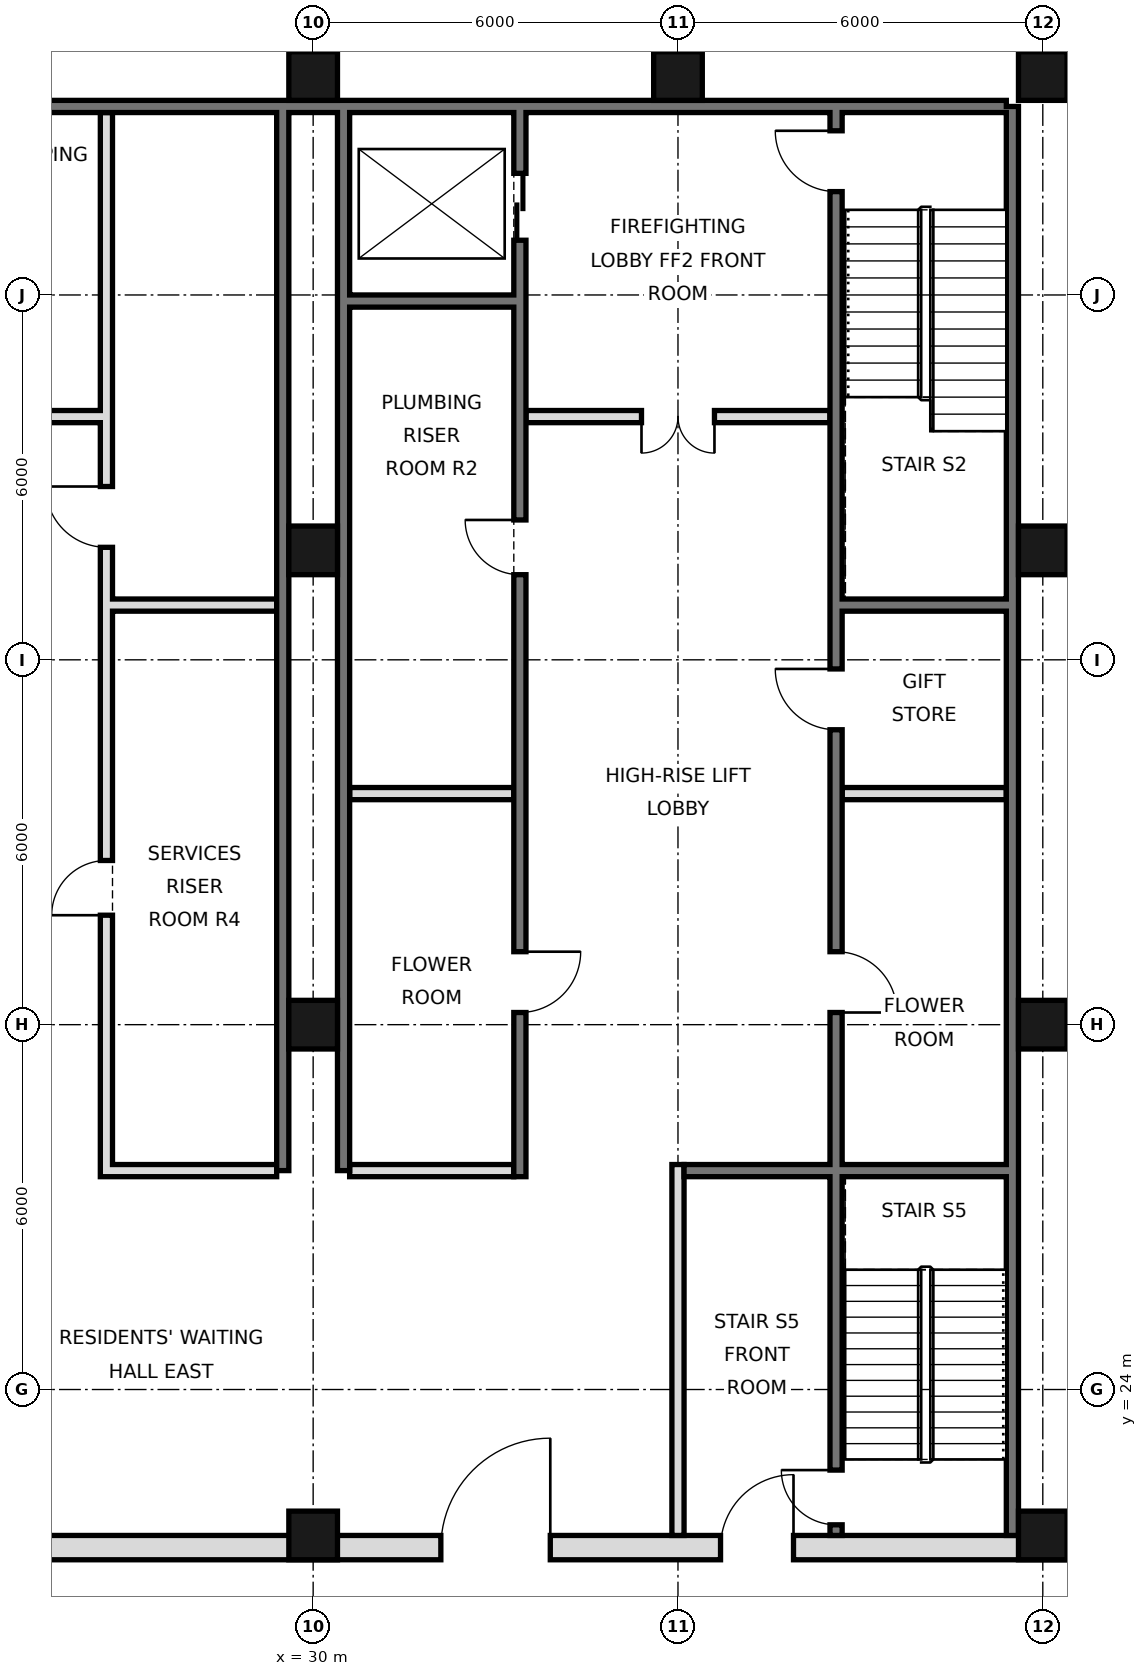
"""IFC4 building model, lengths in metres.
Left out: names, types, materials, properties, quantities, classifications, styles, units other than length and angle.
Written with IfcOpenShell. Run it as: python <this file> out.ifc"""

import sys

from ifc_helpers import new_model, si_unit, direction, frame, frame_2d, origin, origin_2d, place, context, subcontext, project, spatial, rectangle, hollow_rectangle, extrude, element, fill, save


model = new_model("IFC4")
c1 = context("Model", 3, precision=1e-05, world=origin(), true_north=direction((0.0, 1.0)))
c2 = subcontext(c1, "Body", "Model", "MODEL_VIEW")
j1 = project(units=[si_unit("LENGTHUNIT", "METRE"), si_unit("PLANEANGLEUNIT", "RADIAN")], contexts=[c1])
p1 = place(None, origin())
s1 = spatial("IfcSite", under=j1, at=p1, CompositionType="ELEMENT")
p2 = place(p1, origin())
s2 = spatial("IfcBuilding", under=s1, at=p2, CompositionType="ELEMENT")
p3 = place(p2, frame((0.0, 0.0, 134.0)))
s3 = spatial("IfcBuildingStorey", under=s2, at=p3, CompositionType="ELEMENT", Elevation=134.0)
for number, where, z_axis, x_axis in (
    (1, (30.0, 21.6, 0.0), (0.0, 0.0, 1.0), (1.0, 0.0, 0.0)),
    (2, (30.0, 30.0, 0.0), (0.0, 0.0, 1.0), (1.0, 0.0, 0.0)),
    (3, (30.0, 37.8, 0.0), (0.0, 0.0, 1.0), (1.0, 0.0, 0.0)),
    (4, (30.0, 45.6, 0.0), (0.0, 0.0, 1.0), (1.0, 0.0, 0.0)),
    (5, (36.0, 45.6, 0.0), (0.0, 0.0, 1.0), (1.0, 0.0, 0.0)),
    (6, (42.0, 21.6, 0.0), (0.0, 0.0, 1.0), (1.0, 0.0, 0.0)),
    (7, (42.0, 30.0, 0.0), (0.0, 0.0, 1.0), (1.0, 0.0, 0.0)),
    (8, (42.0, 37.8, 0.0), (0.0, 0.0, 1.0), (1.0, 0.0, 0.0)),
    (9, (42.0, 45.6, 0.0), (0.0, 0.0, 1.0), (1.0, 0.0, 0.0)),
):
    element("IfcColumn", number, at=place(p3, frame(where, z_axis=z_axis, x_axis=x_axis)), inside=s3, PredefinedType="COLUMN", context=c2, shape_type="SweptSolid", body=[
        extrude(hollow_rectangle(XDim=0.8, YDim=0.8, WallThickness=0.05, at=origin_2d()), origin(), (0.0, 0.0, 1.0), 4.4),
    ])
p4 = place(p3, frame((41.5, 21.6, 0.0), z_axis=(0.0, 0.0, 1.0), x_axis=(0.0, 1.0, 0.0)))
e10 = element("IfcWall", 10, at=p4, inside=s3, PredefinedType="SOLIDWALL", context=c2, shape_type="SweptSolid", body=[
    extrude(rectangle(XDim=23.5, YDim=0.2, at=frame_2d((11.75, 0.0))), origin(), (0.0, 0.0, 1.0), 4.1),
])
p5 = place(p3, frame((6.6, 45.1, 0.0), z_axis=(0.0, 0.0, 1.0), x_axis=(1.0, 0.0, 0.0)))
e11 = element("IfcWall", 11, at=p5, inside=s3, PredefinedType="SOLIDWALL", context=c2, shape_type="SweptSolid", body=[
    extrude(rectangle(XDim=34.8, YDim=0.2, at=frame_2d((17.4, 0.0))), origin(), (0.0, 0.0, 1.0), 4.1),
])
for number, where, z_axis, x_axis in (
    (12, (29.5, 27.6, 0.0), (0.0, 0.0, 1.0), (0.0, 1.0, 0.0)),
    (13, (30.5, 27.6, 0.0), (0.0, 0.0, 1.0), (0.0, 1.0, 0.0)),
):
    element("IfcWall", number, at=place(p3, frame(where, z_axis=z_axis, x_axis=x_axis)), inside=s3, PredefinedType="SOLIDWALL", context=c2, shape_type="SweptSolid", body=[
        extrude(rectangle(XDim=17.5, YDim=0.2, at=frame_2d((8.75, 0.0))), origin(), (0.0, 0.0, 1.0), 4.1),
    ])
p6 = place(p3, frame((5.6, 21.4, 0.0), z_axis=(0.0, 0.0, 1.0), x_axis=(1.0, 0.0, 0.0)))
e14 = element("IfcWall", 14, at=p6, inside=s3, PredefinedType="SOLIDWALL", context=c2, shape_type="SweptSolid", body=[
    extrude(rectangle(XDim=36.8, YDim=0.4, at=frame_2d((18.4, 0.0))), origin(), (0.0, 0.0, 1.0), 4.1),
])
p7 = place(p6, frame((8.5, 0.0, 0.0)))
e15 = element("IfcOpeningElement", 15, at=p7, cuts=e14, PredefinedType="OPENING", context=c2, shape_type="SweptSolid", body=[
    extrude(rectangle(XDim=1.8, YDim=2.1, at=frame_2d((0.9, 1.05))), frame((0.0, 0.21, 0.0), z_axis=(0.0, -1.0, 0.0), x_axis=(1.0, 0.0, 0.0)), (0.0, 0.0, 1.0), 0.42),
])
p8 = place(p6, frame((17.5, 0.0, 0.0)))
e16 = element("IfcOpeningElement", 16, at=p8, cuts=e14, PredefinedType="OPENING", context=c2, shape_type="SweptSolid", body=[
    extrude(rectangle(XDim=1.8, YDim=2.1, at=frame_2d((0.9, 1.05))), frame((0.0, 0.21, 0.0), z_axis=(0.0, -1.0, 0.0), x_axis=(1.0, 0.0, 0.0)), (0.0, 0.0, 1.0), 0.42),
])
p9 = place(p6, frame((26.5, 0.0, 0.0)))
e17 = element("IfcOpeningElement", 17, at=p9, cuts=e14, PredefinedType="OPENING", context=c2, shape_type="SweptSolid", body=[
    extrude(rectangle(XDim=1.8, YDim=2.1, at=frame_2d((0.9, 1.05))), frame((0.0, 0.21, 0.0), z_axis=(0.0, -1.0, 0.0), x_axis=(1.0, 0.0, 0.0)), (0.0, 0.0, 1.0), 0.42),
])
p10 = place(p6, frame((4.5, 0.0, 0.0)))
e18 = element("IfcOpeningElement", 18, at=p10, cuts=e14, PredefinedType="OPENING", context=c2, shape_type="SweptSolid", body=[
    extrude(rectangle(XDim=1.2, YDim=2.1, at=frame_2d((0.6, 1.05))), frame((0.0, 0.21, 0.0), z_axis=(0.0, -1.0, 0.0), x_axis=(1.0, 0.0, 0.0)), (0.0, 0.0, 1.0), 0.42),
])
p11 = place(p6, frame((31.1, 0.0, 0.0)))
e19 = element("IfcOpeningElement", 19, at=p11, cuts=e14, PredefinedType="OPENING", context=c2, shape_type="SweptSolid", body=[
    extrude(rectangle(XDim=1.2, YDim=2.1, at=frame_2d((0.6, 1.05))), frame((0.0, 0.21, 0.0), z_axis=(0.0, -1.0, 0.0), x_axis=(1.0, 0.0, 0.0)), (0.0, 0.0, 1.0), 0.42),
])
p12 = place(p3, frame((26.6, 27.5, 0.0), z_axis=(0.0, 0.0, 1.0), x_axis=(0.0, 1.0, 0.0)))
e20 = element("IfcWall", 20, at=p12, inside=s3, PredefinedType="SOLIDWALL", context=c2, shape_type="SweptSolid", body=[
    extrude(rectangle(XDim=17.5, YDim=0.2, at=frame_2d((8.75, 0.0))), origin(), (0.0, 0.0, 1.0), 4.1),
])
p13 = place(p12, frame((4.3, 0.0, 0.0)))
e21 = element("IfcOpeningElement", 21, at=p13, cuts=e20, PredefinedType="OPENING", context=c2, shape_type="SweptSolid", body=[
    extrude(rectangle(XDim=0.9, YDim=2.1, at=frame_2d((0.45, 1.05))), frame((0.0, 0.11, 0.0), z_axis=(0.0, -1.0, 0.0), x_axis=(1.0, 0.0, 0.0)), (0.0, 0.0, 1.0), 0.22),
])
p14 = place(p12, frame((10.35, 0.0, 0.0)))
e22 = element("IfcOpeningElement", 22, at=p14, cuts=e20, PredefinedType="OPENING", context=c2, shape_type="SweptSolid", body=[
    extrude(rectangle(XDim=1.0, YDim=2.1, at=frame_2d((0.5, 1.05))), frame((0.0, 0.11, 0.0), z_axis=(0.0, -1.0, 0.0), x_axis=(1.0, 0.0, 0.0)), (0.0, 0.0, 1.0), 0.22),
])
p15 = place(p3, frame((33.4, 27.5, 0.0), z_axis=(0.0, 0.0, 1.0), x_axis=(0.0, 1.0, 0.0)))
e23 = element("IfcWall", 23, at=p15, inside=s3, PredefinedType="SOLIDWALL", context=c2, shape_type="SweptSolid", body=[
    extrude(rectangle(XDim=17.5, YDim=0.2, at=frame_2d((8.75, 0.0))), origin(), (0.0, 0.0, 1.0), 4.1),
])
p16 = place(p15, frame((15.4, 0.0, 0.0)))
e24 = element("IfcOpeningElement", 24, at=p16, cuts=e23, PredefinedType="OPENING", context=c2, shape_type="SweptSolid", body=[
    extrude(rectangle(XDim=1.1, YDim=2.1, at=frame_2d((0.55, 1.05))), frame((0.0, 0.11, 0.0), z_axis=(0.0, -1.0, 0.0), x_axis=(1.0, 0.0, 0.0)), (0.0, 0.0, 1.0), 0.22),
])
p17 = place(p15, frame((2.7, 0.0, 0.0)))
e25 = element("IfcOpeningElement", 25, at=p17, cuts=e23, PredefinedType="OPENING", context=c2, shape_type="SweptSolid", body=[
    extrude(rectangle(XDim=1.0, YDim=2.1, at=frame_2d((0.5, 1.05))), frame((0.0, 0.11, 0.0), z_axis=(0.0, -1.0, 0.0), x_axis=(1.0, 0.0, 0.0)), (0.0, 0.0, 1.0), 0.22),
])
p18 = place(p15, frame((9.9, 0.0, 0.0)))
e26 = element("IfcOpeningElement", 26, at=p18, cuts=e23, PredefinedType="OPENING", context=c2, shape_type="SweptSolid", body=[
    extrude(rectangle(XDim=0.9, YDim=2.1, at=frame_2d((0.45, 1.05))), frame((0.0, 0.11, 0.0), z_axis=(0.0, -1.0, 0.0), x_axis=(1.0, 0.0, 0.0)), (0.0, 0.0, 1.0), 0.22),
])
p19 = place(p3, frame((36.0, 21.6, 0.0), z_axis=(0.0, 0.0, 1.0), x_axis=(0.0, 1.0, 0.0)))
e27 = element("IfcWall", 27, at=p19, inside=s3, PredefinedType="PARTITIONING", context=c2, shape_type="SweptSolid", body=[
    extrude(rectangle(XDim=6.1, YDim=0.2, at=frame_2d((3.05, 0.0))), origin(), (0.0, 0.0, 1.0), 4.1),
])
p20 = place(p3, frame((38.6, 21.6, 0.0), z_axis=(0.0, 0.0, 1.0), x_axis=(0.0, 1.0, 0.0)))
e28 = element("IfcWall", 28, at=p20, inside=s3, PredefinedType="SOLIDWALL", context=c2, shape_type="SweptSolid", body=[
    extrude(rectangle(XDim=23.4, YDim=0.2, at=frame_2d((11.7, 0.0))), origin(), (0.0, 0.0, 1.0), 4.1),
])
p21 = place(p20, frame((8.6, 0.0, 0.0)))
e29 = element("IfcOpeningElement", 29, at=p21, cuts=e28, PredefinedType="OPENING", context=c2, shape_type="SweptSolid", body=[
    extrude(rectangle(XDim=1.0, YDim=2.1, at=frame_2d((0.5, 1.05))), frame((0.0, 0.11, 0.0), z_axis=(0.0, -1.0, 0.0), x_axis=(1.0, 0.0, 0.0)), (0.0, 0.0, 1.0), 0.22),
])
p22 = place(p20, frame((13.25, 0.0, 0.0)))
e30 = element("IfcOpeningElement", 30, at=p22, cuts=e28, PredefinedType="OPENING", context=c2, shape_type="SweptSolid", body=[
    extrude(rectangle(XDim=1.0, YDim=2.1, at=frame_2d((0.5, 1.05))), frame((0.0, 0.11, 0.0), z_axis=(0.0, -1.0, 0.0), x_axis=(1.0, 0.0, 0.0)), (0.0, 0.0, 1.0), 0.22),
])
p23 = place(p20, frame((22.1, 0.0, 0.0)))
e31 = element("IfcOpeningElement", 31, at=p23, cuts=e28, PredefinedType="OPENING", context=c2, shape_type="SweptSolid", body=[
    extrude(rectangle(XDim=1.0, YDim=2.1, at=frame_2d((0.5, 1.05))), frame((0.0, 0.11, 0.0), z_axis=(0.0, -1.0, 0.0), x_axis=(1.0, 0.0, 0.0)), (0.0, 0.0, 1.0), 0.22),
])
p24 = place(p20, frame((0.175, 0.0, 0.0)))
e32 = element("IfcOpeningElement", 32, at=p24, cuts=e28, PredefinedType="OPENING", context=c2, shape_type="SweptSolid", body=[
    extrude(rectangle(XDim=0.9, YDim=2.1, at=frame_2d((0.45, 1.05))), frame((0.0, 0.11, 0.0), z_axis=(0.0, -1.0, 0.0), x_axis=(1.0, 0.0, 0.0)), (0.0, 0.0, 1.0), 0.22),
])
p25 = place(p3, frame((26.7, 27.6, 0.0), z_axis=(0.0, 0.0, 1.0), x_axis=(1.0, 0.0, 0.0)))
e33 = element("IfcWall", 33, at=p25, inside=s3, PredefinedType="SOLIDWALL", context=c2, shape_type="SweptSolid", body=[
    extrude(rectangle(XDim=2.7, YDim=0.2, at=frame_2d((1.35, 0.0))), origin(), (0.0, 0.0, 1.0), 4.1),
])
p26 = place(p3, frame((30.6, 27.6, 0.0), z_axis=(0.0, 0.0, 1.0), x_axis=(1.0, 0.0, 0.0)))
e34 = element("IfcWall", 34, at=p26, inside=s3, PredefinedType="PARTITIONING", context=c2, shape_type="SweptSolid", body=[
    extrude(rectangle(XDim=2.7, YDim=0.2, at=frame_2d((1.35, 0.0))), origin(), (0.0, 0.0, 1.0), 4.1),
])
p27 = place(p3, frame((36.1, 27.6, 0.0), z_axis=(0.0, 0.0, 1.0), x_axis=(1.0, 0.0, 0.0)))
e35 = element("IfcWall", 35, at=p27, inside=s3, PredefinedType="SOLIDWALL", context=c2, shape_type="SweptSolid", body=[
    extrude(rectangle(XDim=5.3, YDim=0.2, at=frame_2d((2.65, 0.0))), origin(), (0.0, 0.0, 1.0), 4.1),
])
p28 = place(p3, frame((30.6, 33.8, 0.0), z_axis=(0.0, 0.0, 1.0), x_axis=(1.0, 0.0, 0.0)))
e36 = element("IfcWall", 36, at=p28, inside=s3, PredefinedType="SOLIDWALL", context=c2, shape_type="SweptSolid", body=[
    extrude(rectangle(XDim=2.7, YDim=0.2, at=frame_2d((1.35, 0.0))), origin(), (0.0, 0.0, 1.0), 4.1),
])
p29 = place(p3, frame((38.7, 33.8, 0.0), z_axis=(0.0, 0.0, 1.0), x_axis=(1.0, 0.0, 0.0)))
e37 = element("IfcWall", 37, at=p29, inside=s3, PredefinedType="PARTITIONING", context=c2, shape_type="SweptSolid", body=[
    extrude(rectangle(XDim=2.7, YDim=0.2, at=frame_2d((1.35, 0.0))), origin(), (0.0, 0.0, 1.0), 4.1),
])
for number, where, z_axis, x_axis in (
    (38, (26.7, 36.9, 0.0), (0.0, 0.0, 1.0), (1.0, 0.0, 0.0)),
    (39, (38.7, 36.9, 0.0), (0.0, 0.0, 1.0), (1.0, 0.0, 0.0)),
):
    element("IfcWall", number, at=place(p3, frame(where, z_axis=z_axis, x_axis=x_axis)), inside=s3, PredefinedType="SOLIDWALL", context=c2, shape_type="SweptSolid", body=[
        extrude(rectangle(XDim=2.7, YDim=0.2, at=frame_2d((1.35, 0.0))), origin(), (0.0, 0.0, 1.0), 4.1),
    ])
p30 = place(p3, frame((21.5, 40.0, 0.0), z_axis=(0.0, 0.0, 1.0), x_axis=(1.0, 0.0, 0.0)))
e40 = element("IfcWall", 40, at=p30, inside=s3, PredefinedType="PARTITIONING", context=c2, shape_type="SweptSolid", body=[
    extrude(rectangle(XDim=5.0, YDim=0.2, at=frame_2d((2.5, 0.0))), origin(), (0.0, 0.0, 1.0), 4.1),
])
p31 = place(p30, frame((1.9, 0.0, 0.0)))
e41 = element("IfcOpeningElement", 41, at=p31, cuts=e40, PredefinedType="OPENING", context=c2, shape_type="SweptSolid", body=[
    extrude(rectangle(XDim=1.2, YDim=2.1, at=frame_2d((0.6, 1.05))), frame((0.0, 0.11, 0.0), z_axis=(0.0, -1.0, 0.0), x_axis=(1.0, 0.0, 0.0)), (0.0, 0.0, 1.0), 0.22),
])
p32 = place(p3, frame((33.5, 40.0, 0.0), z_axis=(0.0, 0.0, 1.0), x_axis=(1.0, 0.0, 0.0)))
e42 = element("IfcWall", 42, at=p32, inside=s3, PredefinedType="PARTITIONING", context=c2, shape_type="SweptSolid", body=[
    extrude(rectangle(XDim=5.0, YDim=0.2, at=frame_2d((2.5, 0.0))), origin(), (0.0, 0.0, 1.0), 4.1),
])
p33 = place(p32, frame((1.9, 0.0, 0.0)))
e43 = element("IfcOpeningElement", 43, at=p33, cuts=e42, PredefinedType="OPENING", context=c2, shape_type="SweptSolid", body=[
    extrude(rectangle(XDim=1.2, YDim=2.1, at=frame_2d((0.6, 1.05))), frame((0.0, 0.11, 0.0), z_axis=(0.0, -1.0, 0.0), x_axis=(1.0, 0.0, 0.0)), (0.0, 0.0, 1.0), 0.22),
])
p34 = place(p3, frame((30.6, 41.9, 0.0), z_axis=(0.0, 0.0, 1.0), x_axis=(1.0, 0.0, 0.0)))
e44 = element("IfcWall", 44, at=p34, inside=s3, PredefinedType="SOLIDWALL", context=c2, shape_type="SweptSolid", body=[
    extrude(rectangle(XDim=2.7, YDim=0.2, at=frame_2d((1.35, 0.0))), origin(), (0.0, 0.0, 1.0), 4.1),
])
p35 = place(p9, frame((1.8, 0.0, 0.0), z_axis=(0.0, 0.0, 1.0), x_axis=(-1.0, 0.0, 0.0)))
e45 = element("IfcDoor", 45, at=p35, inside=s3, OperationType="SINGLE_SWING_LEFT", PredefinedType="DOOR", context=c2, shape_type="SweptSolid", body=[
    extrude(rectangle(XDim=1.8, YDim=2.1, at=frame_2d((0.9, 1.05))), frame((0.0, 0.025, 0.0), z_axis=(0.0, -1.0, 0.0), x_axis=(1.0, 0.0, 0.0)), (0.0, 0.0, 1.0), 0.05),
])
fill(e17, e45)
p36 = place(p11, frame((1.2, 0.0, 0.0), z_axis=(0.0, 0.0, 1.0), x_axis=(-1.0, 0.0, 0.0)))
e46 = element("IfcDoor", 46, at=p36, inside=s3, OperationType="SINGLE_SWING_LEFT", PredefinedType="DOOR", context=c2, shape_type="SweptSolid", body=[
    extrude(rectangle(XDim=1.2, YDim=2.1, at=frame_2d((0.6, 1.05))), frame((0.0, 0.025, 0.0), z_axis=(0.0, -1.0, 0.0), x_axis=(1.0, 0.0, 0.0)), (0.0, 0.0, 1.0), 0.05),
])
fill(e19, e46)
p37 = place(p33, frame((1.2, 0.0, 0.0), z_axis=(0.0, 0.0, 1.0), x_axis=(-1.0, 0.0, 0.0)))
e47 = element("IfcDoor", 47, at=p37, inside=s3, OperationType="DOUBLE_DOOR_SINGLE_SWING", PredefinedType="DOOR", context=c2, shape_type="SweptSolid", body=[
    extrude(rectangle(XDim=1.2, YDim=2.1, at=frame_2d((0.6, 1.05))), frame((0.0, 0.025, 0.0), z_axis=(0.0, -1.0, 0.0), x_axis=(1.0, 0.0, 0.0)), (0.0, 0.0, 1.0), 0.05),
])
fill(e43, e47)
p38 = place(p16, origin())
e48 = element("IfcDoor", 48, at=p38, inside=s3, OperationType="DOUBLE_DOOR_SLIDING", PredefinedType="DOOR", context=c2, shape_type="SweptSolid", body=[
    extrude(rectangle(XDim=1.1, YDim=2.1, at=frame_2d((0.55, 1.05))), frame((0.0, 0.025, 0.0), z_axis=(0.0, -1.0, 0.0), x_axis=(1.0, 0.0, 0.0)), (0.0, 0.0, 1.0), 0.05),
])
fill(e24, e48)
p39 = place(p21, frame((1.0, 0.0, 0.0), z_axis=(0.0, 0.0, 1.0), x_axis=(-1.0, 0.0, 0.0)))
e49 = element("IfcDoor", 49, at=p39, inside=s3, OperationType="SINGLE_SWING_RIGHT", PredefinedType="DOOR", context=c2, shape_type="SweptSolid", body=[
    extrude(rectangle(XDim=1.0, YDim=2.1, at=frame_2d((0.5, 1.05))), frame((0.0, 0.025, 0.0), z_axis=(0.0, -1.0, 0.0), x_axis=(1.0, 0.0, 0.0)), (0.0, 0.0, 1.0), 0.05),
])
fill(e29, e49)
p40 = place(p22, frame((1.0, 0.0, 0.0), z_axis=(0.0, 0.0, 1.0), x_axis=(-1.0, 0.0, 0.0)))
e50 = element("IfcDoor", 50, at=p40, inside=s3, OperationType="SINGLE_SWING_LEFT", PredefinedType="DOOR", context=c2, shape_type="SweptSolid", body=[
    extrude(rectangle(XDim=1.0, YDim=2.1, at=frame_2d((0.5, 1.05))), frame((0.0, 0.025, 0.0), z_axis=(0.0, -1.0, 0.0), x_axis=(1.0, 0.0, 0.0)), (0.0, 0.0, 1.0), 0.05),
])
fill(e30, e50)
p41 = place(p17, origin())
e51 = element("IfcDoor", 51, at=p41, inside=s3, OperationType="SINGLE_SWING_RIGHT", PredefinedType="DOOR", context=c2, shape_type="SweptSolid", body=[
    extrude(rectangle(XDim=1.0, YDim=2.1, at=frame_2d((0.5, 1.05))), frame((0.0, 0.025, 0.0), z_axis=(0.0, -1.0, 0.0), x_axis=(1.0, 0.0, 0.0)), (0.0, 0.0, 1.0), 0.05),
])
fill(e25, e51)
p42 = place(p23, frame((1.0, 0.0, 0.0), z_axis=(0.0, 0.0, 1.0), x_axis=(-1.0, 0.0, 0.0)))
e52 = element("IfcDoor", 52, at=p42, inside=s3, OperationType="SINGLE_SWING_LEFT", PredefinedType="DOOR", context=c2, shape_type="SweptSolid", body=[
    extrude(rectangle(XDim=1.0, YDim=2.1, at=frame_2d((0.5, 1.05))), frame((0.0, 0.025, 0.0), z_axis=(0.0, -1.0, 0.0), x_axis=(1.0, 0.0, 0.0)), (0.0, 0.0, 1.0), 0.05),
])
fill(e31, e52)
p43 = place(p24, frame((0.9, 0.0, 0.0), z_axis=(0.0, 0.0, 1.0), x_axis=(-1.0, 0.0, 0.0)))
e53 = element("IfcDoor", 53, at=p43, inside=s3, OperationType="SINGLE_SWING_LEFT", PredefinedType="DOOR", context=c2, shape_type="SweptSolid", body=[
    extrude(rectangle(XDim=0.9, YDim=2.1, at=frame_2d((0.45, 1.05))), frame((0.0, 0.025, 0.0), z_axis=(0.0, -1.0, 0.0), x_axis=(1.0, 0.0, 0.0)), (0.0, 0.0, 1.0), 0.05),
])
fill(e32, e53)
p44 = place(p18, frame((0.9, 0.0, 0.0), z_axis=(0.0, 0.0, 1.0), x_axis=(-1.0, 0.0, 0.0)))
e54 = element("IfcDoor", 54, at=p44, inside=s3, OperationType="SINGLE_SWING_LEFT", PredefinedType="DOOR", context=c2, shape_type="SweptSolid", body=[
    extrude(rectangle(XDim=0.9, YDim=2.1, at=frame_2d((0.45, 1.05))), frame((0.0, 0.025, 0.0), z_axis=(0.0, -1.0, 0.0), x_axis=(1.0, 0.0, 0.0)), (0.0, 0.0, 1.0), 0.05),
])
fill(e26, e54)
p45 = place(p13, origin())
e55 = element("IfcDoor", 55, at=p45, inside=s3, OperationType="SINGLE_SWING_LEFT", PredefinedType="DOOR", context=c2, shape_type="SweptSolid", body=[
    extrude(rectangle(XDim=0.9, YDim=2.1, at=frame_2d((0.45, 1.05))), frame((0.0, 0.025, 0.0), z_axis=(0.0, -1.0, 0.0), x_axis=(1.0, 0.0, 0.0)), (0.0, 0.0, 1.0), 0.05),
])
fill(e21, e55)
p46 = place(p14, frame((1.0, 0.0, 0.0), z_axis=(0.0, 0.0, 1.0), x_axis=(-1.0, 0.0, 0.0)))
e56 = element("IfcDoor", 56, at=p46, inside=s3, OperationType="SINGLE_SWING_LEFT", PredefinedType="DOOR", context=c2, shape_type="SweptSolid", body=[
    extrude(rectangle(XDim=1.0, YDim=2.1, at=frame_2d((0.5, 1.05))), frame((0.0, 0.025, 0.0), z_axis=(0.0, -1.0, 0.0), x_axis=(1.0, 0.0, 0.0)), (0.0, 0.0, 1.0), 0.05),
])
fill(e22, e56)
save(model, sys.argv[1])
